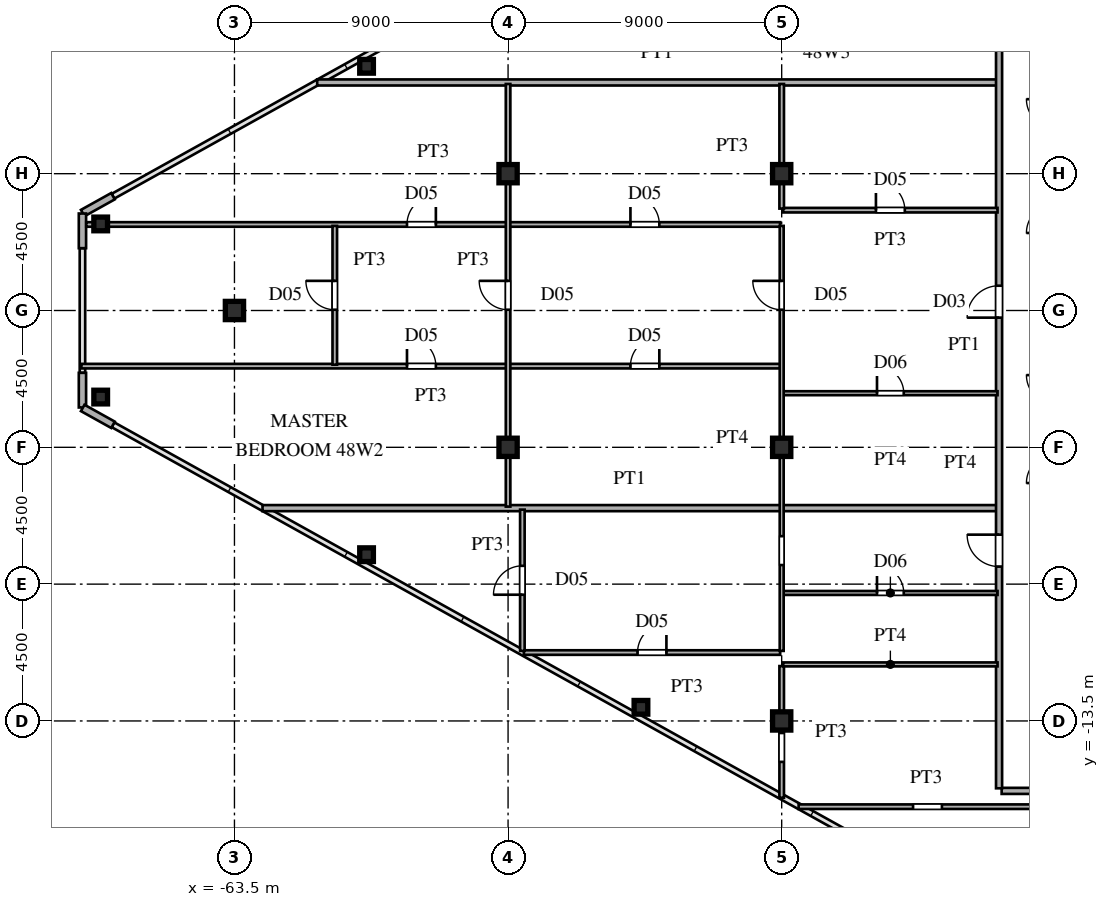
"""IFC4 building model, lengths in metres.
Left out: names, types, materials, properties, quantities, classifications, styles, units other than length and angle.
Written with IfcOpenShell. Run it as: python <this file> out.ifc"""

import sys

from ifc_helpers import new_model, si_unit, direction, frame, frame_2d, origin, origin_2d, place, context, subcontext, project, spatial, rectangle, hollow_rectangle, i_section, extrude, source, transform, mapped, element, fill, save


model = new_model("IFC4")
c1 = context("Model", 3, precision=1e-05, world=origin(), true_north=direction((0.0, 1.0)))
c2 = subcontext(c1, "Body", "Model", "MODEL_VIEW")
j1 = project(units=[si_unit("LENGTHUNIT", "METRE"), si_unit("PLANEANGLEUNIT", "RADIAN")], contexts=[c1])
p1 = place(None, origin())
s1 = spatial("IfcSite", under=j1, at=p1, CompositionType="ELEMENT")
p2 = place(p1, origin())
s2 = spatial("IfcBuilding", under=s1, at=p2, CompositionType="ELEMENT")
p3 = place(p2, frame((0.0, 0.0, 181.5)))
s3 = spatial("IfcBuildingStorey", under=s2, at=p3, CompositionType="ELEMENT", Elevation=181.5)
m1 = source(origin(), c2, "Body", "SweptSolid", [
    extrude(i_section(OverallWidth=0.6, OverallDepth=0.6, WebThickness=0.025, FlangeThickness=0.04, at=origin_2d()), origin(), (0.0, 0.0, 1.0), 3.6),
])
for number, where, z_axis, x_axis in (
    (1, (-45.5, -13.5, 0.0), (0.0, 0.0, 1.0), (1.0, 0.0, 0.0)),
    (2, (-45.5, -4.5, 0.0), (0.0, 0.0, 1.0), (1.0, 0.0, 0.0)),
    (3, (-45.5, 4.5, 0.0), (0.0, 0.0, 1.0), (1.0, 0.0, 0.0)),
    (4, (-54.5, -4.5, 0.0), (0.0, 0.0, 1.0), (1.0, 0.0, 0.0)),
    (5, (-54.5, 4.5, 0.0), (0.0, 0.0, 1.0), (1.0, 0.0, 0.0)),
    (6, (-63.5, 0.0, 0.0), (0.0, 0.0, 1.0), (1.0, 0.0, 0.0)),
):
    element("IfcColumn", number, at=place(p3, frame(where, z_axis=z_axis, x_axis=x_axis)), inside=s3, PredefinedType="COLUMN", context=c2, shape_type="MappedRepresentation", body=[
        mapped(m1, transform((0.0, 0.0, 0.0), scale=1.0)),
    ])
m2 = source(origin(), c2, "Body", "SweptSolid", [
    extrude(hollow_rectangle(XDim=0.45, YDim=0.45, WallThickness=0.018, at=origin_2d()), origin(), (0.0, 0.0, 1.0), 3.6),
])
for number, where, z_axis, x_axis in (
    (7, (-67.9, 2.847, 0.0), (0.0, 0.0, 1.0), (1.0, 0.0, 0.0)),
    (8, (-67.9, -2.847, 0.0), (0.0, 0.0, 1.0), (1.0, 0.0, 0.0)),
    (9, (-50.129, -13.051, 0.0), (0.0, 0.0, 1.0), (1.0, 0.0, 0.0)),
    (10, (-59.155, -8.031, 0.0), (0.0, 0.0, 1.0), (1.0, 0.0, 0.0)),
    (11, (-59.155, 8.031, 0.0), (0.0, 0.0, 1.0), (1.0, 0.0, 0.0)),
):
    element("IfcColumn", number, at=place(p3, frame(where, z_axis=z_axis, x_axis=x_axis)), inside=s3, PredefinedType="COLUMN", context=c2, shape_type="MappedRepresentation", body=[
        mapped(m2, transform((0.0, 0.0, 0.0), scale=1.0)),
    ])
for number, where, z_axis, x_axis in (
    (12, (-67.495, 3.759, 0.0), (0.0, 0.0, 1.0), (-0.874, -0.486, 0.0)),
    (13, (-68.5, 3.19, 0.0), (0.0, 0.0, 1.0), (0.0, -1.0, 0.0)),
    (14, (-68.5, -2.05, 0.0), (0.0, 0.0, 1.0), (0.0, -1.0, 0.0)),
    (15, (-68.491, -3.205, 0.0), (0.0, 0.0, 1.0), (0.874, -0.486, 0.0)),
):
    element("IfcWall", number, at=place(p3, frame(where, z_axis=z_axis, x_axis=x_axis)), inside=s3, PredefinedType="SOLIDWALL", context=c2, shape_type="SweptSolid", body=[
        extrude(rectangle(XDim=1.14, YDim=0.24, at=frame_2d((0.57, 0.0))), origin(), (0.0, 0.0, 1.0), 3.38),
    ])
p4 = place(p3, frame((-44.943, -16.32, 0.0), z_axis=(0.0, 0.0, 1.0), x_axis=(1.0, 0.0, 0.0)))
e16 = element("IfcWall", 16, at=p4, inside=s3, PredefinedType="PARTITIONING", context=c2, shape_type="SweptSolid", body=[
    extrude(rectangle(XDim=8.393, YDim=0.15, at=frame_2d((4.197, 0.0))), origin(), (0.0, 0.0, 1.0), 3.38),
])
p5 = place(p4, frame((3.764, 0.0, 0.0)))
e17 = element("IfcOpeningElement", 17, at=p5, cuts=e16, PredefinedType="OPENING", context=c2, shape_type="SweptSolid", body=[
    extrude(rectangle(XDim=0.95, YDim=2.15, at=frame_2d((0.475, 1.075))), frame((0.0, 0.085, 0.0), z_axis=(0.0, -1.0, 0.0), x_axis=(1.0, 0.0, 0.0)), (0.0, 0.0, 1.0), 0.17),
])
p6 = place(p3, frame((-38.265, -15.8, 0.0), z_axis=(0.0, 0.0, 1.0), x_axis=(1.0, 0.0, 0.0)))
e18 = element("IfcWall", 18, at=p6, inside=s3, PredefinedType="PARTITIONING", context=c2, shape_type="SweptSolid", body=[
    extrude(rectangle(XDim=10.765, YDim=0.2, at=frame_2d((5.382, 0.0))), origin(), (0.0, 0.0, 1.0), 3.38),
])
p7 = place(p3, frame((-45.45, -11.64, 0.0), z_axis=(0.0, 0.0, 1.0), x_axis=(1.0, 0.0, 0.0)))
e19 = element("IfcWall", 19, at=p7, inside=s3, PredefinedType="PARTITIONING", context=c2, shape_type="SweptSolid", body=[
    extrude(rectangle(XDim=7.05, YDim=0.13, at=frame_2d((3.525, 0.0))), origin(), (0.0, 0.0, 1.0), 3.38),
])
p8 = place(p3, frame((-53.983, -11.25, 0.0), z_axis=(0.0, 0.0, 1.0), x_axis=(1.0, 0.0, 0.0)))
e20 = element("IfcWall", 20, at=p8, inside=s3, PredefinedType="PARTITIONING", context=c2, shape_type="SweptSolid", body=[
    extrude(rectangle(XDim=8.433, YDim=0.15, at=frame_2d((4.216, 0.0))), origin(), (0.0, 0.0, 1.0), 3.38),
])
p9 = place(p8, frame((3.741, 0.0, 0.0)))
e21 = element("IfcOpeningElement", 21, at=p9, cuts=e20, PredefinedType="OPENING", context=c2, shape_type="SweptSolid", body=[
    extrude(rectangle(XDim=0.95, YDim=2.15, at=frame_2d((0.475, 1.075))), frame((0.0, 0.085, 0.0), z_axis=(0.0, -1.0, 0.0), x_axis=(1.0, 0.0, 0.0)), (0.0, 0.0, 1.0), 0.17),
])
p10 = place(p3, frame((-45.45, -9.29, 0.0), z_axis=(0.0, 0.0, 1.0), x_axis=(1.0, 0.0, 0.0)))
e22 = element("IfcWall", 22, at=p10, inside=s3, PredefinedType="PARTITIONING", context=c2, shape_type="SweptSolid", body=[
    extrude(rectangle(XDim=7.05, YDim=0.13, at=frame_2d((3.525, 0.0))), origin(), (0.0, 0.0, 1.0), 3.38),
])
p11 = place(p10, frame((3.085, 0.0, 0.0)))
e23 = element("IfcOpeningElement", 23, at=p11, cuts=e22, PredefinedType="OPENING", context=c2, shape_type="SweptSolid", body=[
    extrude(rectangle(XDim=0.88, YDim=2.1, at=frame_2d((0.44, 1.05))), frame((0.0, 0.075, 0.0), z_axis=(0.0, -1.0, 0.0), x_axis=(1.0, 0.0, 0.0)), (0.0, 0.0, 1.0), 0.15),
])
p12 = place(p3, frame((-62.577, -6.5, 0.0), z_axis=(0.0, 0.0, 1.0), x_axis=(1.0, 0.0, 0.0)))
e24 = element("IfcWall", 24, at=p12, inside=s3, PredefinedType="PARTITIONING", context=c2, shape_type="SweptSolid", body=[
    extrude(rectangle(XDim=24.147, YDim=0.2, at=frame_2d((12.073, 0.0))), origin(), (0.0, 0.0, 1.0), 3.38),
])
p13 = place(p3, frame((-45.45, -2.72, 0.0), z_axis=(0.0, 0.0, 1.0), x_axis=(1.0, 0.0, 0.0)))
e25 = element("IfcWall", 25, at=p13, inside=s3, PredefinedType="PARTITIONING", context=c2, shape_type="SweptSolid", body=[
    extrude(rectangle(XDim=7.05, YDim=0.13, at=frame_2d((3.525, 0.0))), origin(), (0.0, 0.0, 1.0), 3.38),
])
p14 = place(p13, frame((3.085, 0.0, 0.0)))
e26 = element("IfcOpeningElement", 26, at=p14, cuts=e25, PredefinedType="OPENING", context=c2, shape_type="SweptSolid", body=[
    extrude(rectangle(XDim=0.88, YDim=2.1, at=frame_2d((0.44, 1.05))), frame((0.0, 0.075, 0.0), z_axis=(0.0, -1.0, 0.0), x_axis=(1.0, 0.0, 0.0)), (0.0, 0.0, 1.0), 0.15),
])
p15 = place(p3, frame((-68.535, -1.83, 0.0), z_axis=(0.0, 0.0, 1.0), x_axis=(1.0, 0.0, 0.0)))
e27 = element("IfcWall", 27, at=p15, inside=s3, PredefinedType="PARTITIONING", context=c2, shape_type="SweptSolid", body=[
    extrude(rectangle(XDim=22.985, YDim=0.15, at=frame_2d((11.492, 0.0))), origin(), (0.0, 0.0, 1.0), 3.38),
])
p16 = place(p15, frame((18.06, 0.0, 0.0)))
e28 = element("IfcOpeningElement", 28, at=p16, cuts=e27, PredefinedType="OPENING", context=c2, shape_type="SweptSolid", body=[
    extrude(rectangle(XDim=0.95, YDim=2.15, at=frame_2d((0.475, 1.075))), frame((0.0, 0.085, 0.0), z_axis=(0.0, -1.0, 0.0), x_axis=(1.0, 0.0, 0.0)), (0.0, 0.0, 1.0), 0.17),
])
p17 = place(p15, frame((10.71, 0.0, 0.0)))
e29 = element("IfcOpeningElement", 29, at=p17, cuts=e27, PredefinedType="OPENING", context=c2, shape_type="SweptSolid", body=[
    extrude(rectangle(XDim=0.95, YDim=2.15, at=frame_2d((0.475, 1.075))), frame((0.0, 0.085, 0.0), z_axis=(0.0, -1.0, 0.0), x_axis=(1.0, 0.0, 0.0)), (0.0, 0.0, 1.0), 0.17),
])
p18 = place(p3, frame((-68.375, 2.83, 0.0), z_axis=(0.0, 0.0, 1.0), x_axis=(1.0, 0.0, 0.0)))
e30 = element("IfcWall", 30, at=p18, inside=s3, PredefinedType="PARTITIONING", context=c2, shape_type="SweptSolid", body=[
    extrude(rectangle(XDim=22.825, YDim=0.15, at=frame_2d((11.413, 0.0))), origin(), (0.0, 0.0, 1.0), 3.38),
])
p19 = place(p18, frame((17.9, 0.0, 0.0)))
e31 = element("IfcOpeningElement", 31, at=p19, cuts=e30, PredefinedType="OPENING", context=c2, shape_type="SweptSolid", body=[
    extrude(rectangle(XDim=0.95, YDim=2.15, at=frame_2d((0.475, 1.075))), frame((0.0, 0.085, 0.0), z_axis=(0.0, -1.0, 0.0), x_axis=(1.0, 0.0, 0.0)), (0.0, 0.0, 1.0), 0.17),
])
p20 = place(p18, frame((10.55, 0.0, 0.0)))
e32 = element("IfcOpeningElement", 32, at=p20, cuts=e30, PredefinedType="OPENING", context=c2, shape_type="SweptSolid", body=[
    extrude(rectangle(XDim=0.95, YDim=2.15, at=frame_2d((0.475, 1.075))), frame((0.0, 0.085, 0.0), z_axis=(0.0, -1.0, 0.0), x_axis=(1.0, 0.0, 0.0)), (0.0, 0.0, 1.0), 0.17),
])
p21 = place(p3, frame((-45.45, 3.3, 0.0), z_axis=(0.0, 0.0, 1.0), x_axis=(1.0, 0.0, 0.0)))
e33 = element("IfcWall", 33, at=p21, inside=s3, PredefinedType="PARTITIONING", context=c2, shape_type="SweptSolid", body=[
    extrude(rectangle(XDim=7.05, YDim=0.15, at=frame_2d((3.525, 0.0))), origin(), (0.0, 0.0, 1.0), 3.38),
])
p22 = place(p21, frame((3.05, 0.0, 0.0)))
e34 = element("IfcOpeningElement", 34, at=p22, cuts=e33, PredefinedType="OPENING", context=c2, shape_type="SweptSolid", body=[
    extrude(rectangle(XDim=0.95, YDim=2.15, at=frame_2d((0.475, 1.075))), frame((0.0, 0.085, 0.0), z_axis=(0.0, -1.0, 0.0), x_axis=(1.0, 0.0, 0.0)), (0.0, 0.0, 1.0), 0.17),
])
p23 = place(p3, frame((-60.779, 7.5, 0.0), z_axis=(0.0, 0.0, 1.0), x_axis=(1.0, 0.0, 0.0)))
e35 = element("IfcWall", 35, at=p23, inside=s3, PredefinedType="PARTITIONING", context=c2, shape_type="SweptSolid", body=[
    extrude(rectangle(XDim=22.349, YDim=0.2, at=frame_2d((11.175, 0.0))), origin(), (0.0, 0.0, 1.0), 3.38),
])
p24 = place(p3, frame((-60.2, -1.783, 0.0), z_axis=(0.0, 0.0, 1.0), x_axis=(0.0, 1.0, 0.0)))
e36 = element("IfcWall", 36, at=p24, inside=s3, PredefinedType="PARTITIONING", context=c2, shape_type="SweptSolid", body=[
    extrude(rectangle(XDim=4.566, YDim=0.15, at=frame_2d((2.283, 0.0))), origin(), (0.0, 0.0, 1.0), 3.38),
])
p25 = place(p24, frame((1.808, 0.0, 0.0)))
e37 = element("IfcOpeningElement", 37, at=p25, cuts=e36, PredefinedType="OPENING", context=c2, shape_type="SweptSolid", body=[
    extrude(rectangle(XDim=0.95, YDim=2.15, at=frame_2d((0.475, 1.075))), frame((0.0, 0.085, 0.0), z_axis=(0.0, -1.0, 0.0), x_axis=(1.0, 0.0, 0.0)), (0.0, 0.0, 1.0), 0.17),
])
p26 = place(p3, frame((-54.5, -6.45, 0.0), z_axis=(0.0, 0.0, 1.0), x_axis=(0.0, 1.0, 0.0)))
e38 = element("IfcWall", 38, at=p26, inside=s3, PredefinedType="PARTITIONING", context=c2, shape_type="SweptSolid", body=[
    extrude(rectangle(XDim=13.9, YDim=0.15, at=frame_2d((6.95, 0.0))), origin(), (0.0, 0.0, 1.0), 2.78),
])
p27 = place(p26, frame((6.475, 0.0, 0.0)))
e39 = element("IfcOpeningElement", 39, at=p27, cuts=e38, PredefinedType="OPENING", context=c2, shape_type="SweptSolid", body=[
    extrude(rectangle(XDim=0.95, YDim=2.15, at=frame_2d((0.475, 1.075))), frame((0.0, 0.085, 0.0), z_axis=(0.0, -1.0, 0.0), x_axis=(1.0, 0.0, 0.0)), (0.0, 0.0, 1.0), 0.17),
])
p28 = place(p3, frame((-54.03, -11.196, 0.0), z_axis=(0.0, 0.0, 1.0), x_axis=(0.0, 1.0, 0.0)))
e40 = element("IfcWall", 40, at=p28, inside=s3, PredefinedType="PARTITIONING", context=c2, shape_type="SweptSolid", body=[
    extrude(rectangle(XDim=4.646, YDim=0.15, at=frame_2d((2.323, 0.0))), origin(), (0.0, 0.0, 1.0), 3.38),
])
p29 = place(p28, frame((1.848, 0.0, 0.0)))
e41 = element("IfcOpeningElement", 41, at=p29, cuts=e40, PredefinedType="OPENING", context=c2, shape_type="SweptSolid", body=[
    extrude(rectangle(XDim=0.95, YDim=2.15, at=frame_2d((0.475, 1.075))), frame((0.0, 0.085, 0.0), z_axis=(0.0, -1.0, 0.0), x_axis=(1.0, 0.0, 0.0)), (0.0, 0.0, 1.0), 0.17),
])
p30 = place(p3, frame((-45.5, -16.027, 0.0), z_axis=(0.0, 0.0, 1.0), x_axis=(0.0, 1.0, 0.0)))
e42 = element("IfcWall", 42, at=p30, inside=s3, PredefinedType="PARTITIONING", context=c2, shape_type="SweptSolid", body=[
    extrude(rectangle(XDim=4.332, YDim=0.15, at=frame_2d((2.166, 0.0))), origin(), (0.0, 0.0, 1.0), 2.78),
])
p31 = place(p30, frame((1.181, 0.0, 0.0)))
e43 = element("IfcOpeningElement", 43, at=p31, cuts=e42, PredefinedType="OPENING", context=c2, shape_type="SweptSolid", body=[
    extrude(rectangle(XDim=0.95, YDim=2.15, at=frame_2d((0.475, 1.075))), frame((0.0, 0.085, 0.0), z_axis=(0.0, -1.0, 0.0), x_axis=(1.0, 0.0, 0.0)), (0.0, 0.0, 1.0), 0.17),
])
p32 = place(p3, frame((-45.5, -11.196, 0.0), z_axis=(0.0, 0.0, 1.0), x_axis=(0.0, 1.0, 0.0)))
e44 = element("IfcWall", 44, at=p32, inside=s3, PredefinedType="PARTITIONING", context=c2, shape_type="SweptSolid", body=[
    extrude(rectangle(XDim=13.979, YDim=0.13, at=frame_2d((6.99, 0.0))), origin(), (0.0, 0.0, 1.0), 2.78),
])
p33 = place(p32, frame((2.823, 0.0, 0.0)))
e45 = element("IfcOpeningElement", 45, at=p33, cuts=e44, PredefinedType="OPENING", context=c2, shape_type="SweptSolid", body=[
    extrude(rectangle(XDim=0.95, YDim=2.15, at=frame_2d((0.475, 1.075))), frame((0.0, 0.075, 0.0), z_axis=(0.0, -1.0, 0.0), x_axis=(1.0, 0.0, 0.0)), (0.0, 0.0, 1.0), 0.15),
])
p34 = place(p32, frame((11.221, 0.0, 0.0)))
e46 = element("IfcOpeningElement", 46, at=p34, cuts=e44, PredefinedType="OPENING", context=c2, shape_type="SweptSolid", body=[
    extrude(rectangle(XDim=0.95, YDim=2.15, at=frame_2d((0.475, 1.075))), frame((0.0, 0.075, 0.0), z_axis=(0.0, -1.0, 0.0), x_axis=(1.0, 0.0, 0.0)), (0.0, 0.0, 1.0), 0.15),
])
p35 = place(p3, frame((-45.5, 3.352, 0.0), z_axis=(0.0, 0.0, 1.0), x_axis=(0.0, 1.0, 0.0)))
e47 = element("IfcWall", 47, at=p35, inside=s3, PredefinedType="PARTITIONING", context=c2, shape_type="SweptSolid", body=[
    extrude(rectangle(XDim=4.098, YDim=0.15, at=frame_2d((2.049, 0.0))), origin(), (0.0, 0.0, 1.0), 2.78),
])
p36 = place(p3, frame((-38.35, -15.715, 0.0), z_axis=(0.0, 0.0, 1.0), x_axis=(0.0, 1.0, 0.0)))
e48 = element("IfcWall", 48, at=p36, inside=s3, PredefinedType="PARTITIONING", context=c2, shape_type="SweptSolid", body=[
    extrude(rectangle(XDim=31.43, YDim=0.2, at=frame_2d((15.715, 0.0))), origin(), (0.0, 0.0, 1.0), 3.38),
])
p37 = place(p36, frame((7.292, 0.0, 0.0)))
e49 = element("IfcOpeningElement", 49, at=p37, cuts=e48, PredefinedType="OPENING", context=c2, shape_type="SweptSolid", body=[
    extrude(rectangle(XDim=1.05, YDim=2.25, at=frame_2d((0.525, 1.125))), frame((0.0, 0.11, 0.0), z_axis=(0.0, -1.0, 0.0), x_axis=(1.0, 0.0, 0.0)), (0.0, 0.0, 1.0), 0.22),
])
p38 = place(p36, frame((15.48, 0.0, 0.0)))
e50 = element("IfcOpeningElement", 50, at=p38, cuts=e48, PredefinedType="OPENING", context=c2, shape_type="SweptSolid", body=[
    extrude(rectangle(XDim=1.05, YDim=2.25, at=frame_2d((0.525, 1.125))), frame((0.0, 0.11, 0.0), z_axis=(0.0, -1.0, 0.0), x_axis=(1.0, 0.0, 0.0)), (0.0, 0.0, 1.0), 0.22),
])
p39 = place(p36, frame((26.84, 0.0, 0.0)))
e51 = element("IfcOpeningElement", 51, at=p39, cuts=e48, PredefinedType="OPENING", context=c2, shape_type="SweptSolid", body=[
    extrude(rectangle(XDim=1.05, YDim=2.25, at=frame_2d((0.525, 1.125))), frame((0.0, 0.11, 0.0), z_axis=(0.0, -1.0, 0.0), x_axis=(1.0, 0.0, 0.0)), (0.0, 0.0, 1.0), 0.22),
])
m3 = source(origin(), c2, "Body", "SweptSolid", [
    extrude(rectangle(XDim=0.95, YDim=2.15, at=frame_2d((0.475, 1.075))), frame((0.0, 0.025, 0.0), z_axis=(0.0, -1.0, 0.0), x_axis=(1.0, 0.0, 0.0)), (0.0, 0.0, 1.0), 0.05),
])
p40 = place(p9, origin())
e52 = element("IfcDoor", 52, at=p40, inside=s3, OperationType="SINGLE_SWING_RIGHT", PredefinedType="DOOR", context=c2, shape_type="MappedRepresentation", body=[
    mapped(m3, transform((0.0, 0.0, 0.0), scale=1.0)),
])
fill(e21, e52)
m4 = source(origin(), c2, "Body", "SweptSolid", [
    extrude(rectangle(XDim=0.88, YDim=2.1, at=frame_2d((0.44, 1.05))), frame((0.0, 0.025, 0.0), z_axis=(0.0, -1.0, 0.0), x_axis=(1.0, 0.0, 0.0)), (0.0, 0.0, 1.0), 0.05),
])
p41 = place(p11, origin())
e53 = element("IfcDoor", 53, at=p41, inside=s3, OperationType="SINGLE_SWING_LEFT", PredefinedType="DOOR", context=c2, shape_type="MappedRepresentation", body=[
    mapped(m4, transform((0.0, 0.0, 0.0), scale=1.0)),
])
fill(e23, e53)
p42 = place(p14, origin())
e54 = element("IfcDoor", 54, at=p42, inside=s3, OperationType="SINGLE_SWING_LEFT", PredefinedType="DOOR", context=c2, shape_type="MappedRepresentation", body=[
    mapped(m4, transform((0.0, 0.0, 0.0), scale=1.0)),
])
fill(e26, e54)
p43 = place(p16, origin())
e55 = element("IfcDoor", 55, at=p43, inside=s3, OperationType="SINGLE_SWING_RIGHT", PredefinedType="DOOR", context=c2, shape_type="MappedRepresentation", body=[
    mapped(m3, transform((0.0, 0.0, 0.0), scale=1.0)),
])
fill(e28, e55)
p44 = place(p17, origin())
e56 = element("IfcDoor", 56, at=p44, inside=s3, OperationType="SINGLE_SWING_LEFT", PredefinedType="DOOR", context=c2, shape_type="MappedRepresentation", body=[
    mapped(m3, transform((0.0, 0.0, 0.0), scale=1.0)),
])
fill(e29, e56)
p45 = place(p19, origin())
e57 = element("IfcDoor", 57, at=p45, inside=s3, OperationType="SINGLE_SWING_LEFT", PredefinedType="DOOR", context=c2, shape_type="MappedRepresentation", body=[
    mapped(m3, transform((0.0, 0.0, 0.0), scale=1.0)),
])
fill(e31, e57)
p46 = place(p20, origin())
e58 = element("IfcDoor", 58, at=p46, inside=s3, OperationType="SINGLE_SWING_RIGHT", PredefinedType="DOOR", context=c2, shape_type="MappedRepresentation", body=[
    mapped(m3, transform((0.0, 0.0, 0.0), scale=1.0)),
])
fill(e32, e58)
p47 = place(p22, origin())
e59 = element("IfcDoor", 59, at=p47, inside=s3, OperationType="SINGLE_SWING_LEFT", PredefinedType="DOOR", context=c2, shape_type="MappedRepresentation", body=[
    mapped(m3, transform((0.0, 0.0, 0.0), scale=1.0)),
])
fill(e34, e59)
p48 = place(p25, origin())
e60 = element("IfcDoor", 60, at=p48, inside=s3, OperationType="SINGLE_SWING_RIGHT", PredefinedType="DOOR", context=c2, shape_type="MappedRepresentation", body=[
    mapped(m3, transform((0.0, 0.0, 0.0), scale=1.0)),
])
fill(e37, e60)
p49 = place(p27, origin())
e61 = element("IfcDoor", 61, at=p49, inside=s3, OperationType="SINGLE_SWING_RIGHT", PredefinedType="DOOR", context=c2, shape_type="MappedRepresentation", body=[
    mapped(m3, transform((0.0, 0.0, 0.0), scale=1.0)),
])
fill(e39, e61)
p50 = place(p29, origin())
e62 = element("IfcDoor", 62, at=p50, inside=s3, OperationType="SINGLE_SWING_LEFT", PredefinedType="DOOR", context=c2, shape_type="MappedRepresentation", body=[
    mapped(m3, transform((0.0, 0.0, 0.0), scale=1.0)),
])
fill(e41, e62)
p51 = place(p34, origin())
e63 = element("IfcDoor", 63, at=p51, inside=s3, OperationType="SINGLE_SWING_RIGHT", PredefinedType="DOOR", context=c2, shape_type="MappedRepresentation", body=[
    mapped(m3, transform((0.0, 0.0, 0.0), scale=1.0)),
])
fill(e46, e63)
m5 = source(origin(), c2, "Body", "SweptSolid", [
    extrude(rectangle(XDim=1.05, YDim=2.25, at=frame_2d((0.525, 1.125))), frame((0.0, 0.025, 0.0), z_axis=(0.0, -1.0, 0.0), x_axis=(1.0, 0.0, 0.0)), (0.0, 0.0, 1.0), 0.05),
])
p52 = place(p37, origin())
e64 = element("IfcDoor", 64, at=p52, inside=s3, OperationType="SINGLE_SWING_RIGHT", PredefinedType="DOOR", context=c2, shape_type="MappedRepresentation", body=[
    mapped(m5, transform((0.0, 0.0, 0.0), scale=1.0)),
])
fill(e49, e64)
p53 = place(p38, origin())
e65 = element("IfcDoor", 65, at=p53, inside=s3, OperationType="SINGLE_SWING_LEFT", PredefinedType="DOOR", context=c2, shape_type="MappedRepresentation", body=[
    mapped(m5, transform((0.0, 0.0, 0.0), scale=1.0)),
])
fill(e50, e65)
save(model, sys.argv[1])
